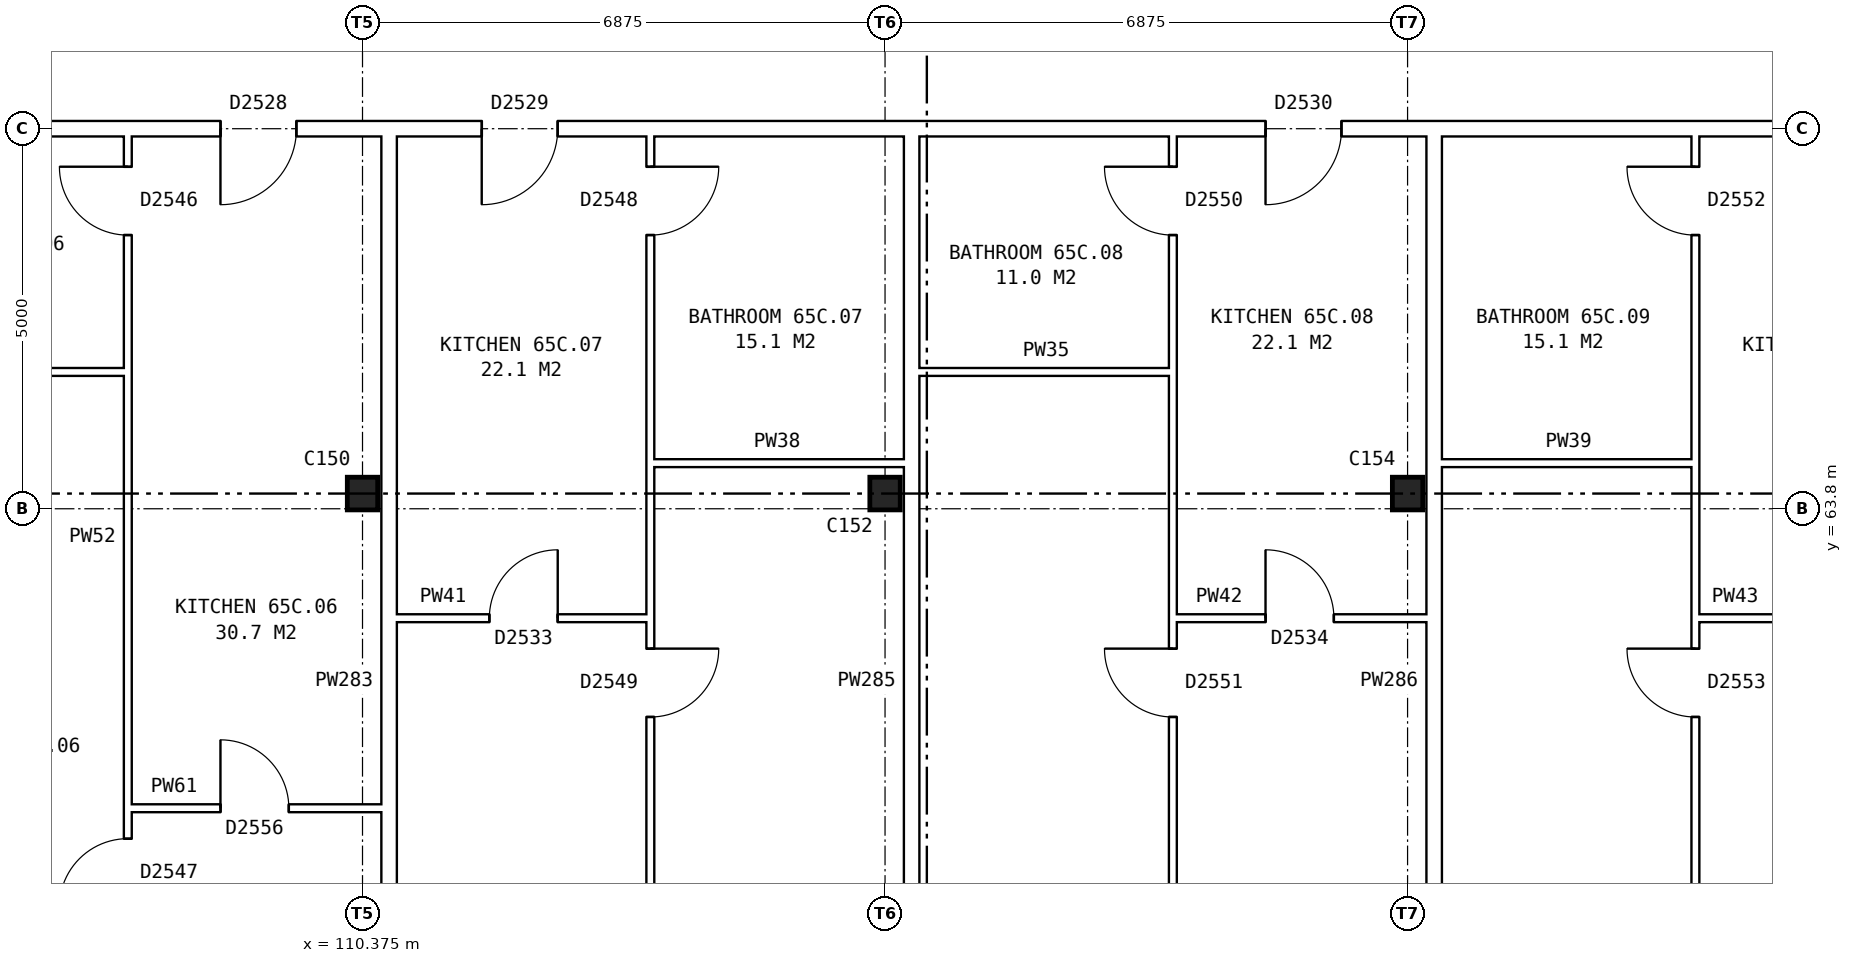
"""IFC4 building model, lengths in metres.
Left out: names, types, materials, properties, quantities, classifications, styles, units other than length and angle.
Written with IfcOpenShell. Run it as: python <this file> out.ifc"""

import sys

from ifc_helpers import new_model, si_unit, direction, frame, frame_2d, origin, origin_2d, place, context, subcontext, project, spatial, rectangle, i_section, extrude, element, fill, save


model = new_model("IFC4")
c1 = context("Model", 3, precision=1e-05, world=origin(), true_north=direction((0.0, 1.0)))
c2 = subcontext(c1, "Body", "Model", "MODEL_VIEW")
j1 = project(units=[si_unit("LENGTHUNIT", "METRE"), si_unit("PLANEANGLEUNIT", "RADIAN")], contexts=[c1])
p1 = place(None, origin())
s1 = spatial("IfcSite", under=j1, at=p1, CompositionType="ELEMENT")
p2 = place(p1, origin())
s2 = spatial("IfcBuilding", under=s1, at=p2, CompositionType="ELEMENT")
p3 = place(p2, frame((0.0, 0.0, 230.7)))
s3 = spatial("IfcBuildingStorey", under=s2, at=p3, CompositionType="ELEMENT", Elevation=230.7)
for number, where, z_axis, x_axis in (
    (1, (110.375, 64.0, 0.0), (0.0, 0.0, 1.0), (1.0, 0.0, 0.0)),
    (2, (117.25, 64.0, 0.0), (0.0, 0.0, 1.0), (1.0, 0.0, 0.0)),
    (3, (124.125, 64.0, 0.0), (0.0, 0.0, 1.0), (1.0, 0.0, 0.0)),
):
    element("IfcColumn", number, at=place(p3, frame(where, z_axis=z_axis, x_axis=x_axis)), inside=s3, PredefinedType="COLUMN", context=c2, shape_type="SweptSolid", body=[
        extrude(i_section(OverallWidth=0.4, OverallDepth=0.43, WebThickness=0.028, FlangeThickness=0.04, at=origin_2d()), origin(), (0.0, 0.0, 1.0), 2.85),
    ])
p4 = place(p3, frame((107.287, 59.86, 0.0), z_axis=(0.0, 0.0, 1.0), x_axis=(1.0, 0.0, 0.0)))
e4 = element("IfcWall", 4, at=p4, inside=s3, PredefinedType="PARTITIONING", context=c2, shape_type="SweptSolid", body=[
    extrude(rectangle(XDim=3.338, YDim=0.1, at=frame_2d((1.669, 0.0))), origin(), (0.0, 0.0, 1.0), 2.85),
])
p5 = place(p4, frame((1.219, 0.0, 0.0)))
e5 = element("IfcOpeningElement", 5, at=p5, cuts=e4, PredefinedType="OPENING", context=c2, shape_type="SweptSolid", body=[
    extrude(rectangle(XDim=0.9, YDim=2.1, at=frame_2d((0.45, 1.05))), frame((0.0, 0.06, 0.0), z_axis=(0.0, -1.0, 0.0), x_axis=(1.0, 0.0, 0.0)), (0.0, 0.0, 1.0), 0.12),
])
p6 = place(p3, frame((110.825, 62.36, 0.0), z_axis=(0.0, 0.0, 1.0), x_axis=(1.0, 0.0, 0.0)))
e6 = element("IfcWall", 6, at=p6, inside=s3, PredefinedType="PARTITIONING", context=c2, shape_type="SweptSolid", body=[
    extrude(rectangle(XDim=3.337, YDim=0.1, at=frame_2d((1.668, 0.0))), origin(), (0.0, 0.0, 1.0), 2.85),
])
p7 = place(p6, frame((1.219, 0.0, 0.0)))
e7 = element("IfcOpeningElement", 7, at=p7, cuts=e6, PredefinedType="OPENING", context=c2, shape_type="SweptSolid", body=[
    extrude(rectangle(XDim=0.9, YDim=2.1, at=frame_2d((0.45, 1.05))), frame((0.0, 0.06, 0.0), z_axis=(0.0, -1.0, 0.0), x_axis=(1.0, 0.0, 0.0)), (0.0, 0.0, 1.0), 0.12),
])
p8 = place(p3, frame((121.037, 62.36, 0.0), z_axis=(0.0, 0.0, 1.0), x_axis=(1.0, 0.0, 0.0)))
e8 = element("IfcWall", 8, at=p8, inside=s3, PredefinedType="PARTITIONING", context=c2, shape_type="SweptSolid", body=[
    extrude(rectangle(XDim=3.338, YDim=0.1, at=frame_2d((1.669, 0.0))), origin(), (0.0, 0.0, 1.0), 2.85),
])
p9 = place(p8, frame((1.219, 0.0, 0.0)))
e9 = element("IfcOpeningElement", 9, at=p9, cuts=e8, PredefinedType="OPENING", context=c2, shape_type="SweptSolid", body=[
    extrude(rectangle(XDim=0.9, YDim=2.1, at=frame_2d((0.45, 1.05))), frame((0.0, 0.06, 0.0), z_axis=(0.0, -1.0, 0.0), x_axis=(1.0, 0.0, 0.0)), (0.0, 0.0, 1.0), 0.12),
])
p10 = place(p3, frame((127.912, 62.36, 0.0), z_axis=(0.0, 0.0, 1.0), x_axis=(1.0, 0.0, 0.0)))
e10 = element("IfcWall", 10, at=p10, inside=s3, PredefinedType="PARTITIONING", context=c2, shape_type="SweptSolid", body=[
    extrude(rectangle(XDim=2.988, YDim=0.1, at=frame_2d((1.494, 0.0))), origin(), (0.0, 0.0, 1.0), 2.85),
])
p11 = place(p10, frame((1.044, 0.0, 0.0)))
e11 = element("IfcOpeningElement", 11, at=p11, cuts=e10, PredefinedType="OPENING", context=c2, shape_type="SweptSolid", body=[
    extrude(rectangle(XDim=0.9, YDim=2.1, at=frame_2d((0.45, 1.05))), frame((0.0, 0.06, 0.0), z_axis=(0.0, -1.0, 0.0), x_axis=(1.0, 0.0, 0.0)), (0.0, 0.0, 1.0), 0.12),
])
p12 = place(p3, frame((114.162, 64.4, 0.0), z_axis=(0.0, 0.0, 1.0), x_axis=(1.0, 0.0, 0.0)))
e12 = element("IfcWall", 12, at=p12, inside=s3, PredefinedType="PARTITIONING", context=c2, shape_type="SweptSolid", body=[
    extrude(rectangle(XDim=3.338, YDim=0.1, at=frame_2d((1.669, 0.0))), origin(), (0.0, 0.0, 1.0), 2.85),
])
for number, where, z_axis, x_axis in (
    (13, (124.575, 64.4, 0.0), (0.0, 0.0, 1.0), (1.0, 0.0, 0.0)),
    (14, (103.95, 65.6, 0.0), (0.0, 0.0, 1.0), (1.0, 0.0, 0.0)),
    (15, (117.7, 65.6, 0.0), (0.0, 0.0, 1.0), (1.0, 0.0, 0.0)),
):
    element("IfcWall", number, at=place(p3, frame(where, z_axis=z_axis, x_axis=x_axis)), inside=s3, PredefinedType="PARTITIONING", context=c2, shape_type="SweptSolid", body=[
        extrude(rectangle(XDim=3.337, YDim=0.1, at=frame_2d((1.668, 0.0))), origin(), (0.0, 0.0, 1.0), 2.85),
    ])
p13 = place(p3, frame((75.64, 68.8, 0.0), z_axis=(0.0, 0.0, 1.0), x_axis=(1.0, 0.0, 0.0)))
e16 = element("IfcWall", 16, at=p13, inside=s3, PredefinedType="PARTITIONING", context=c2, shape_type="SweptSolid", body=[
    extrude(rectangle(XDim=55.72, YDim=0.2, at=frame_2d((27.86, 0.0))), origin(), (0.0, 0.0, 1.0), 2.85),
])
p14 = place(p13, frame((5.191, 0.0, 0.0)))
e17 = element("IfcOpeningElement", 17, at=p14, cuts=e16, PredefinedType="OPENING", context=c2, shape_type="SweptSolid", body=[
    extrude(rectangle(XDim=1.0, YDim=2.1, at=frame_2d((0.5, 1.05))), frame((0.0, 0.11, 0.0), z_axis=(0.0, -1.0, 0.0), x_axis=(1.0, 0.0, 0.0)), (0.0, 0.0, 1.0), 0.22),
])
p15 = place(p13, frame((12.241, 0.0, 0.0)))
e18 = element("IfcOpeningElement", 18, at=p15, cuts=e16, PredefinedType="OPENING", context=c2, shape_type="SweptSolid", body=[
    extrude(rectangle(XDim=1.0, YDim=2.1, at=frame_2d((0.5, 1.05))), frame((0.0, 0.11, 0.0), z_axis=(0.0, -1.0, 0.0), x_axis=(1.0, 0.0, 0.0)), (0.0, 0.0, 1.0), 0.22),
])
p16 = place(p13, frame((22.553, 0.0, 0.0)))
e19 = element("IfcOpeningElement", 19, at=p16, cuts=e16, PredefinedType="OPENING", context=c2, shape_type="SweptSolid", body=[
    extrude(rectangle(XDim=1.0, YDim=2.1, at=frame_2d((0.5, 1.05))), frame((0.0, 0.11, 0.0), z_axis=(0.0, -1.0, 0.0), x_axis=(1.0, 0.0, 0.0)), (0.0, 0.0, 1.0), 0.22),
])
p17 = place(p13, frame((32.866, 0.0, 0.0)))
e20 = element("IfcOpeningElement", 20, at=p17, cuts=e16, PredefinedType="OPENING", context=c2, shape_type="SweptSolid", body=[
    extrude(rectangle(XDim=1.0, YDim=2.1, at=frame_2d((0.5, 1.05))), frame((0.0, 0.11, 0.0), z_axis=(0.0, -1.0, 0.0), x_axis=(1.0, 0.0, 0.0)), (0.0, 0.0, 1.0), 0.22),
])
p18 = place(p13, frame((36.303, 0.0, 0.0)))
e21 = element("IfcOpeningElement", 21, at=p18, cuts=e16, PredefinedType="OPENING", context=c2, shape_type="SweptSolid", body=[
    extrude(rectangle(XDim=1.0, YDim=2.1, at=frame_2d((0.5, 1.05))), frame((0.0, 0.11, 0.0), z_axis=(0.0, -1.0, 0.0), x_axis=(1.0, 0.0, 0.0)), (0.0, 0.0, 1.0), 0.22),
])
p19 = place(p13, frame((46.616, 0.0, 0.0)))
e22 = element("IfcOpeningElement", 22, at=p19, cuts=e16, PredefinedType="OPENING", context=c2, shape_type="SweptSolid", body=[
    extrude(rectangle(XDim=1.0, YDim=2.1, at=frame_2d((0.5, 1.05))), frame((0.0, 0.11, 0.0), z_axis=(0.0, -1.0, 0.0), x_axis=(1.0, 0.0, 0.0)), (0.0, 0.0, 1.0), 0.22),
])
p20 = place(p13, frame((53.496, 0.0, 0.0)))
e23 = element("IfcOpeningElement", 23, at=p20, cuts=e16, PredefinedType="OPENING", context=c2, shape_type="SweptSolid", body=[
    extrude(rectangle(XDim=1.0, YDim=2.1, at=frame_2d((0.5, 1.05))), frame((0.0, 0.11, 0.0), z_axis=(0.0, -1.0, 0.0), x_axis=(1.0, 0.0, 0.0)), (0.0, 0.0, 1.0), 0.22),
])
p21 = place(p3, frame((107.287, 54.36, 0.0), z_axis=(0.0, 0.0, 1.0), x_axis=(0.0, 1.0, 0.0)))
e24 = element("IfcWall", 24, at=p21, inside=s3, PredefinedType="PARTITIONING", context=c2, shape_type="SweptSolid", body=[
    extrude(rectangle(XDim=14.34, YDim=0.1, at=frame_2d((7.17, 0.0))), origin(), (0.0, 0.0, 1.0), 2.85),
])
p22 = place(p21, frame((4.2, 0.0, 0.0)))
e25 = element("IfcOpeningElement", 25, at=p22, cuts=e24, PredefinedType="OPENING", context=c2, shape_type="SweptSolid", body=[
    extrude(rectangle(XDim=0.9, YDim=2.1, at=frame_2d((0.45, 1.05))), frame((0.0, 0.06, 0.0), z_axis=(0.0, -1.0, 0.0), x_axis=(1.0, 0.0, 0.0)), (0.0, 0.0, 1.0), 0.12),
])
p23 = place(p21, frame((13.04, 0.0, 0.0)))
e26 = element("IfcOpeningElement", 26, at=p23, cuts=e24, PredefinedType="OPENING", context=c2, shape_type="SweptSolid", body=[
    extrude(rectangle(XDim=0.9, YDim=2.1, at=frame_2d((0.45, 1.05))), frame((0.0, 0.06, 0.0), z_axis=(0.0, -1.0, 0.0), x_axis=(1.0, 0.0, 0.0)), (0.0, 0.0, 1.0), 0.12),
])
p24 = place(p3, frame((110.725, 54.36, 0.0), z_axis=(0.0, 0.0, 1.0), x_axis=(0.0, 1.0, 0.0)))
e27 = element("IfcWall", 27, at=p24, inside=s3, PredefinedType="PARTITIONING", context=c2, shape_type="SweptSolid", body=[
    extrude(rectangle(XDim=14.34, YDim=0.2, at=frame_2d((7.17, 0.0))), origin(), (0.0, 0.0, 1.0), 2.85),
])
p25 = place(p3, frame((114.162, 54.36, 0.0), z_axis=(0.0, 0.0, 1.0), x_axis=(0.0, 1.0, 0.0)))
e28 = element("IfcWall", 28, at=p25, inside=s3, PredefinedType="PARTITIONING", context=c2, shape_type="SweptSolid", body=[
    extrude(rectangle(XDim=14.34, YDim=0.1, at=frame_2d((7.17, 0.0))), origin(), (0.0, 0.0, 1.0), 2.85),
])
p26 = place(p25, frame((6.7, 0.0, 0.0)))
e29 = element("IfcOpeningElement", 29, at=p26, cuts=e28, PredefinedType="OPENING", context=c2, shape_type="SweptSolid", body=[
    extrude(rectangle(XDim=0.9, YDim=2.1, at=frame_2d((0.45, 1.05))), frame((0.0, 0.06, 0.0), z_axis=(0.0, -1.0, 0.0), x_axis=(1.0, 0.0, 0.0)), (0.0, 0.0, 1.0), 0.12),
])
p27 = place(p25, frame((13.04, 0.0, 0.0)))
e30 = element("IfcOpeningElement", 30, at=p27, cuts=e28, PredefinedType="OPENING", context=c2, shape_type="SweptSolid", body=[
    extrude(rectangle(XDim=0.9, YDim=2.1, at=frame_2d((0.45, 1.05))), frame((0.0, 0.06, 0.0), z_axis=(0.0, -1.0, 0.0), x_axis=(1.0, 0.0, 0.0)), (0.0, 0.0, 1.0), 0.12),
])
p28 = place(p3, frame((117.6, 54.36, 0.0), z_axis=(0.0, 0.0, 1.0), x_axis=(0.0, 1.0, 0.0)))
e31 = element("IfcWall", 31, at=p28, inside=s3, PredefinedType="PARTITIONING", context=c2, shape_type="SweptSolid", body=[
    extrude(rectangle(XDim=14.34, YDim=0.2, at=frame_2d((7.17, 0.0))), origin(), (0.0, 0.0, 1.0), 2.85),
])
p29 = place(p3, frame((121.037, 54.36, 0.0), z_axis=(0.0, 0.0, 1.0), x_axis=(0.0, 1.0, 0.0)))
e32 = element("IfcWall", 32, at=p29, inside=s3, PredefinedType="PARTITIONING", context=c2, shape_type="SweptSolid", body=[
    extrude(rectangle(XDim=14.34, YDim=0.1, at=frame_2d((7.17, 0.0))), origin(), (0.0, 0.0, 1.0), 2.85),
])
p30 = place(p29, frame((6.7, 0.0, 0.0)))
e33 = element("IfcOpeningElement", 33, at=p30, cuts=e32, PredefinedType="OPENING", context=c2, shape_type="SweptSolid", body=[
    extrude(rectangle(XDim=0.9, YDim=2.1, at=frame_2d((0.45, 1.05))), frame((0.0, 0.06, 0.0), z_axis=(0.0, -1.0, 0.0), x_axis=(1.0, 0.0, 0.0)), (0.0, 0.0, 1.0), 0.12),
])
p31 = place(p29, frame((13.04, 0.0, 0.0)))
e34 = element("IfcOpeningElement", 34, at=p31, cuts=e32, PredefinedType="OPENING", context=c2, shape_type="SweptSolid", body=[
    extrude(rectangle(XDim=0.9, YDim=2.1, at=frame_2d((0.45, 1.05))), frame((0.0, 0.06, 0.0), z_axis=(0.0, -1.0, 0.0), x_axis=(1.0, 0.0, 0.0)), (0.0, 0.0, 1.0), 0.12),
])
p32 = place(p3, frame((124.475, 54.36, 0.0), z_axis=(0.0, 0.0, 1.0), x_axis=(0.0, 1.0, 0.0)))
e35 = element("IfcWall", 35, at=p32, inside=s3, PredefinedType="PARTITIONING", context=c2, shape_type="SweptSolid", body=[
    extrude(rectangle(XDim=14.34, YDim=0.2, at=frame_2d((7.17, 0.0))), origin(), (0.0, 0.0, 1.0), 2.85),
])
p33 = place(p3, frame((127.912, 54.36, 0.0), z_axis=(0.0, 0.0, 1.0), x_axis=(0.0, 1.0, 0.0)))
e36 = element("IfcWall", 36, at=p33, inside=s3, PredefinedType="PARTITIONING", context=c2, shape_type="SweptSolid", body=[
    extrude(rectangle(XDim=14.34, YDim=0.1, at=frame_2d((7.17, 0.0))), origin(), (0.0, 0.0, 1.0), 2.85),
])
p34 = place(p33, frame((6.7, 0.0, 0.0)))
e37 = element("IfcOpeningElement", 37, at=p34, cuts=e36, PredefinedType="OPENING", context=c2, shape_type="SweptSolid", body=[
    extrude(rectangle(XDim=0.9, YDim=2.1, at=frame_2d((0.45, 1.05))), frame((0.0, 0.06, 0.0), z_axis=(0.0, -1.0, 0.0), x_axis=(1.0, 0.0, 0.0)), (0.0, 0.0, 1.0), 0.12),
])
p35 = place(p33, frame((13.04, 0.0, 0.0)))
e38 = element("IfcOpeningElement", 38, at=p35, cuts=e36, PredefinedType="OPENING", context=c2, shape_type="SweptSolid", body=[
    extrude(rectangle(XDim=0.9, YDim=2.1, at=frame_2d((0.45, 1.05))), frame((0.0, 0.06, 0.0), z_axis=(0.0, -1.0, 0.0), x_axis=(1.0, 0.0, 0.0)), (0.0, 0.0, 1.0), 0.12),
])
p36 = place(p22, origin())
e39 = element("IfcDoor", 39, at=p36, inside=s3, OperationType="SINGLE_SWING_LEFT", PredefinedType="DOOR", context=c2, shape_type="SweptSolid", body=[
    extrude(rectangle(XDim=0.9, YDim=2.1, at=frame_2d((0.45, 1.05))), frame((0.0, 0.025, 0.0), z_axis=(0.0, -1.0, 0.0), x_axis=(1.0, 0.0, 0.0)), (0.0, 0.0, 1.0), 0.05),
])
fill(e25, e39)
p37 = place(p17, frame((1.0, 0.0, 0.0), z_axis=(0.0, 0.0, 1.0), x_axis=(-1.0, 0.0, 0.0)))
e40 = element("IfcDoor", 40, at=p37, inside=s3, OperationType="SINGLE_SWING_RIGHT", PredefinedType="DOOR", context=c2, shape_type="SweptSolid", body=[
    extrude(rectangle(XDim=1.0, YDim=2.1, at=frame_2d((0.5, 1.05))), frame((0.0, 0.025, 0.0), z_axis=(0.0, -1.0, 0.0), x_axis=(1.0, 0.0, 0.0)), (0.0, 0.0, 1.0), 0.05),
])
fill(e20, e40)
p38 = place(p5, origin())
e41 = element("IfcDoor", 41, at=p38, inside=s3, OperationType="SINGLE_SWING_LEFT", PredefinedType="DOOR", context=c2, shape_type="SweptSolid", body=[
    extrude(rectangle(XDim=0.9, YDim=2.1, at=frame_2d((0.45, 1.05))), frame((0.0, 0.025, 0.0), z_axis=(0.0, -1.0, 0.0), x_axis=(1.0, 0.0, 0.0)), (0.0, 0.0, 1.0), 0.05),
])
fill(e5, e41)
p39 = place(p23, origin())
e42 = element("IfcDoor", 42, at=p39, inside=s3, OperationType="SINGLE_SWING_RIGHT", PredefinedType="DOOR", context=c2, shape_type="SweptSolid", body=[
    extrude(rectangle(XDim=0.9, YDim=2.1, at=frame_2d((0.45, 1.05))), frame((0.0, 0.025, 0.0), z_axis=(0.0, -1.0, 0.0), x_axis=(1.0, 0.0, 0.0)), (0.0, 0.0, 1.0), 0.05),
])
fill(e26, e42)
p40 = place(p26, frame((0.9, 0.0, 0.0), z_axis=(0.0, 0.0, 1.0), x_axis=(-1.0, 0.0, 0.0)))
e43 = element("IfcDoor", 43, at=p40, inside=s3, OperationType="SINGLE_SWING_LEFT", PredefinedType="DOOR", context=c2, shape_type="SweptSolid", body=[
    extrude(rectangle(XDim=0.9, YDim=2.1, at=frame_2d((0.45, 1.05))), frame((0.0, 0.025, 0.0), z_axis=(0.0, -1.0, 0.0), x_axis=(1.0, 0.0, 0.0)), (0.0, 0.0, 1.0), 0.05),
])
fill(e29, e43)
p41 = place(p18, frame((1.0, 0.0, 0.0), z_axis=(0.0, 0.0, 1.0), x_axis=(-1.0, 0.0, 0.0)))
e44 = element("IfcDoor", 44, at=p41, inside=s3, OperationType="SINGLE_SWING_RIGHT", PredefinedType="DOOR", context=c2, shape_type="SweptSolid", body=[
    extrude(rectangle(XDim=1.0, YDim=2.1, at=frame_2d((0.5, 1.05))), frame((0.0, 0.025, 0.0), z_axis=(0.0, -1.0, 0.0), x_axis=(1.0, 0.0, 0.0)), (0.0, 0.0, 1.0), 0.05),
])
fill(e21, e44)
p42 = place(p7, origin())
e45 = element("IfcDoor", 45, at=p42, inside=s3, OperationType="SINGLE_SWING_RIGHT", PredefinedType="DOOR", context=c2, shape_type="SweptSolid", body=[
    extrude(rectangle(XDim=0.9, YDim=2.1, at=frame_2d((0.45, 1.05))), frame((0.0, 0.025, 0.0), z_axis=(0.0, -1.0, 0.0), x_axis=(1.0, 0.0, 0.0)), (0.0, 0.0, 1.0), 0.05),
])
fill(e7, e45)
p43 = place(p27, frame((0.9, 0.0, 0.0), z_axis=(0.0, 0.0, 1.0), x_axis=(-1.0, 0.0, 0.0)))
e46 = element("IfcDoor", 46, at=p43, inside=s3, OperationType="SINGLE_SWING_LEFT", PredefinedType="DOOR", context=c2, shape_type="SweptSolid", body=[
    extrude(rectangle(XDim=0.9, YDim=2.1, at=frame_2d((0.45, 1.05))), frame((0.0, 0.025, 0.0), z_axis=(0.0, -1.0, 0.0), x_axis=(1.0, 0.0, 0.0)), (0.0, 0.0, 1.0), 0.05),
])
fill(e30, e46)
p44 = place(p30, origin())
e47 = element("IfcDoor", 47, at=p44, inside=s3, OperationType="SINGLE_SWING_RIGHT", PredefinedType="DOOR", context=c2, shape_type="SweptSolid", body=[
    extrude(rectangle(XDim=0.9, YDim=2.1, at=frame_2d((0.45, 1.05))), frame((0.0, 0.025, 0.0), z_axis=(0.0, -1.0, 0.0), x_axis=(1.0, 0.0, 0.0)), (0.0, 0.0, 1.0), 0.05),
])
fill(e33, e47)
p45 = place(p19, frame((1.0, 0.0, 0.0), z_axis=(0.0, 0.0, 1.0), x_axis=(-1.0, 0.0, 0.0)))
e48 = element("IfcDoor", 48, at=p45, inside=s3, OperationType="SINGLE_SWING_RIGHT", PredefinedType="DOOR", context=c2, shape_type="SweptSolid", body=[
    extrude(rectangle(XDim=1.0, YDim=2.1, at=frame_2d((0.5, 1.05))), frame((0.0, 0.025, 0.0), z_axis=(0.0, -1.0, 0.0), x_axis=(1.0, 0.0, 0.0)), (0.0, 0.0, 1.0), 0.05),
])
fill(e22, e48)
p46 = place(p9, origin())
e49 = element("IfcDoor", 49, at=p46, inside=s3, OperationType="SINGLE_SWING_LEFT", PredefinedType="DOOR", context=c2, shape_type="SweptSolid", body=[
    extrude(rectangle(XDim=0.9, YDim=2.1, at=frame_2d((0.45, 1.05))), frame((0.0, 0.025, 0.0), z_axis=(0.0, -1.0, 0.0), x_axis=(1.0, 0.0, 0.0)), (0.0, 0.0, 1.0), 0.05),
])
fill(e9, e49)
p47 = place(p31, origin())
e50 = element("IfcDoor", 50, at=p47, inside=s3, OperationType="SINGLE_SWING_RIGHT", PredefinedType="DOOR", context=c2, shape_type="SweptSolid", body=[
    extrude(rectangle(XDim=0.9, YDim=2.1, at=frame_2d((0.45, 1.05))), frame((0.0, 0.025, 0.0), z_axis=(0.0, -1.0, 0.0), x_axis=(1.0, 0.0, 0.0)), (0.0, 0.0, 1.0), 0.05),
])
fill(e34, e50)
p48 = place(p34, origin())
e51 = element("IfcDoor", 51, at=p48, inside=s3, OperationType="SINGLE_SWING_RIGHT", PredefinedType="DOOR", context=c2, shape_type="SweptSolid", body=[
    extrude(rectangle(XDim=0.9, YDim=2.1, at=frame_2d((0.45, 1.05))), frame((0.0, 0.025, 0.0), z_axis=(0.0, -1.0, 0.0), x_axis=(1.0, 0.0, 0.0)), (0.0, 0.0, 1.0), 0.05),
])
fill(e37, e51)
p49 = place(p35, origin())
e52 = element("IfcDoor", 52, at=p49, inside=s3, OperationType="SINGLE_SWING_RIGHT", PredefinedType="DOOR", context=c2, shape_type="SweptSolid", body=[
    extrude(rectangle(XDim=0.9, YDim=2.1, at=frame_2d((0.45, 1.05))), frame((0.0, 0.025, 0.0), z_axis=(0.0, -1.0, 0.0), x_axis=(1.0, 0.0, 0.0)), (0.0, 0.0, 1.0), 0.05),
])
fill(e38, e52)
save(model, sys.argv[1])
